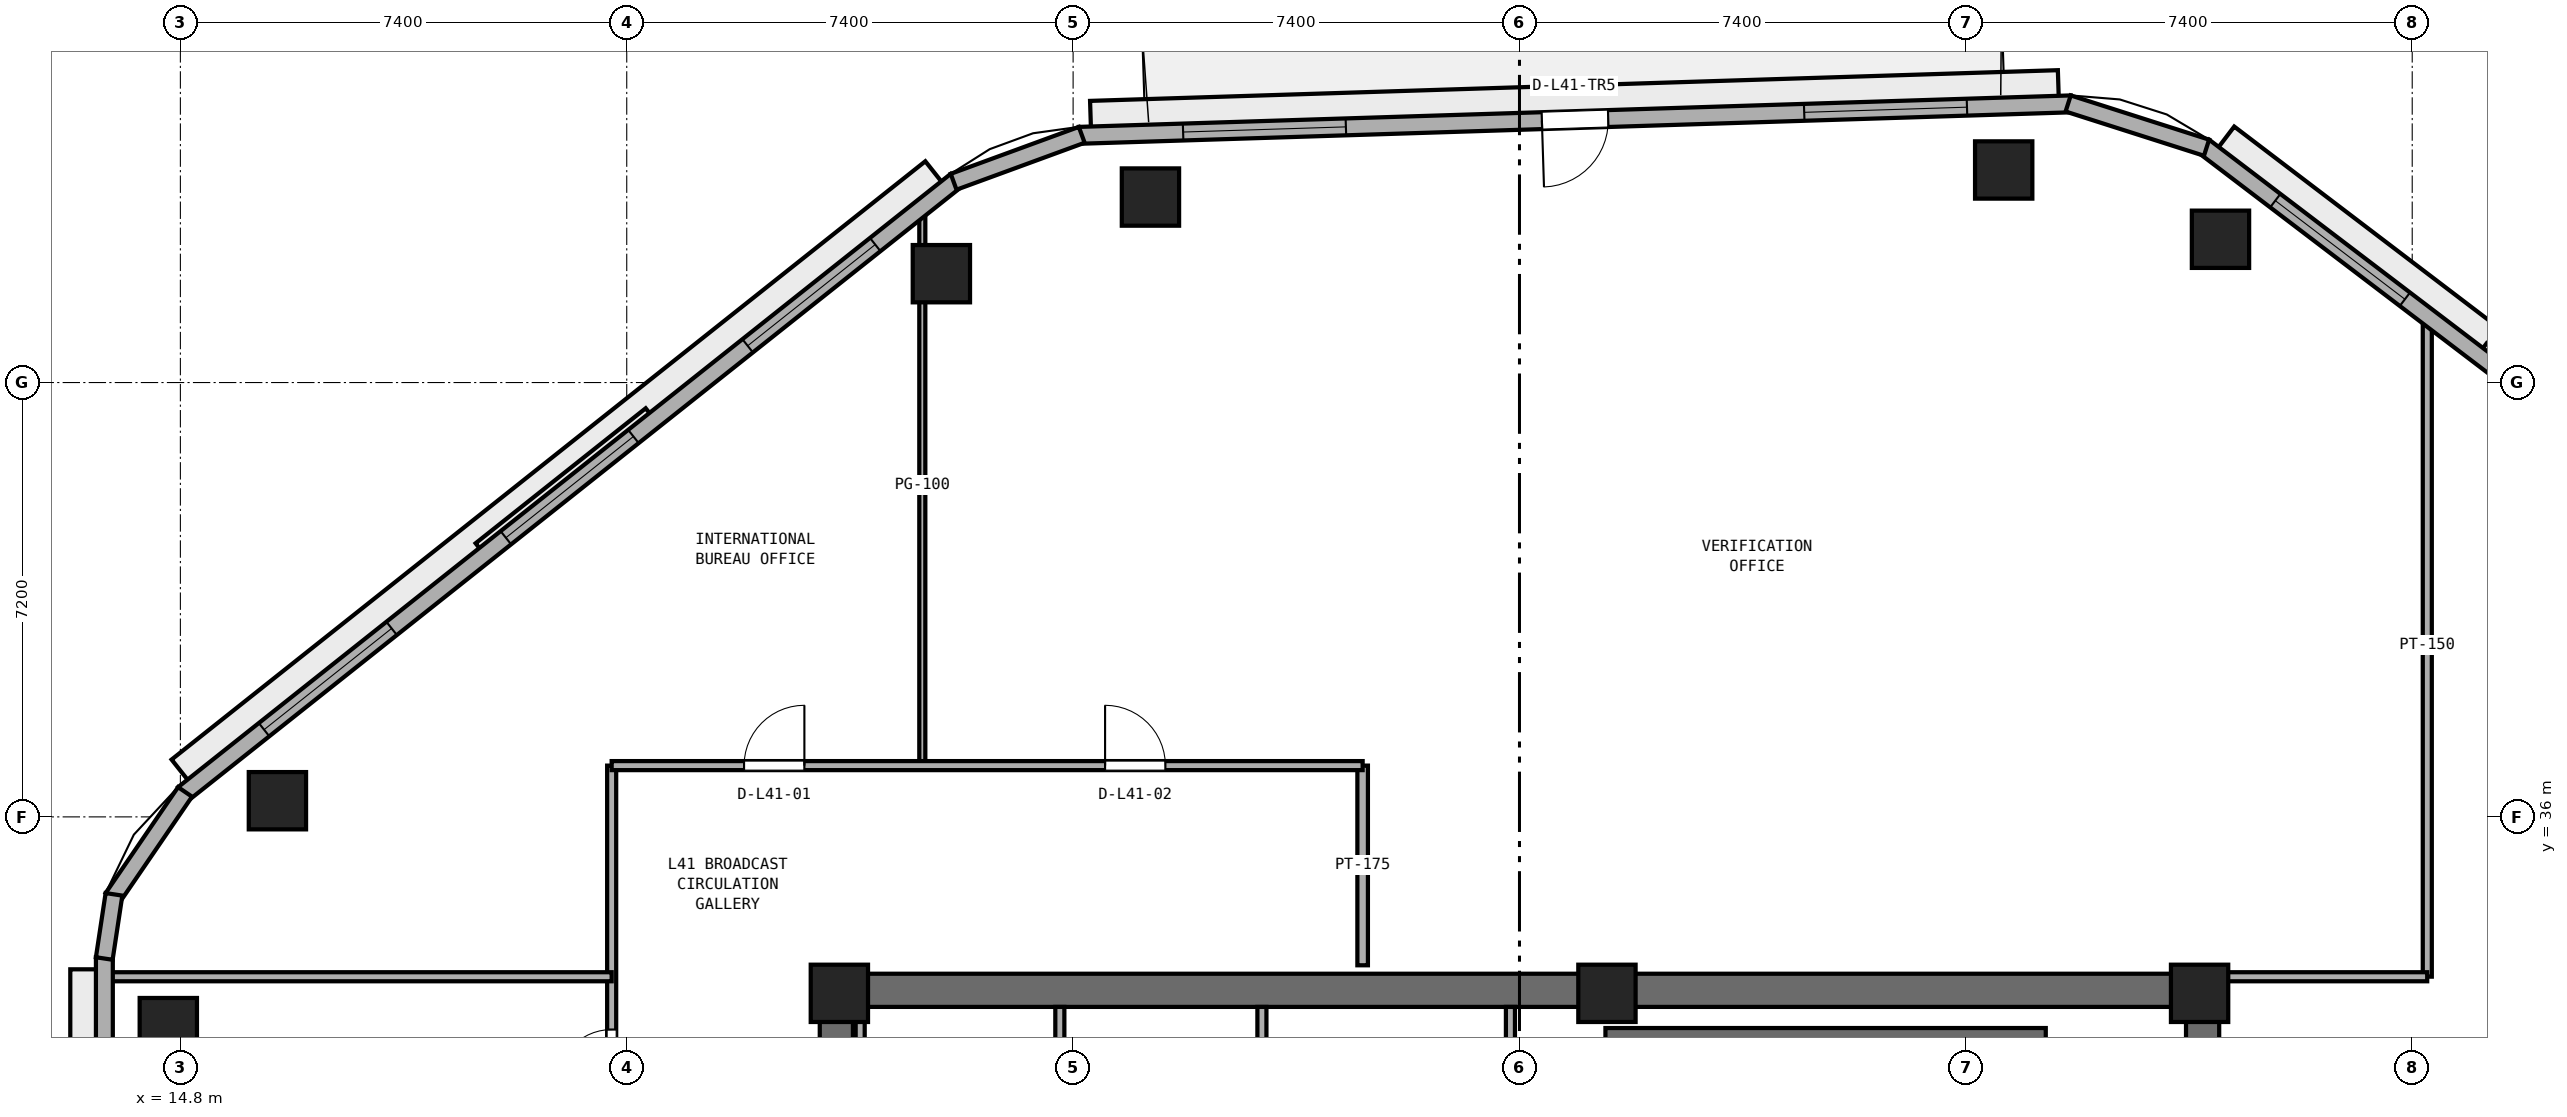
"""IFC4 building model, lengths in metres.
Left out: names, types, materials, properties, quantities, classifications, styles, units other than length and angle.
Written with IfcOpenShell. Run it as: python <this file> out.ifc"""

import sys

from ifc_helpers import new_model, si_unit, direction, frame, frame_2d, origin, origin_2d, place, context, subcontext, project, spatial, rectangle, extrude, element, fill, save


model = new_model("IFC4")
c1 = context("Model", 3, precision=1e-05, world=origin(), true_north=direction((0.0, 1.0)))
c2 = subcontext(c1, "Body", "Model", "MODEL_VIEW")
j1 = project(units=[si_unit("LENGTHUNIT", "METRE"), si_unit("PLANEANGLEUNIT", "RADIAN")], contexts=[c1])
p1 = place(None, origin())
s1 = spatial("IfcSite", under=j1, at=p1, CompositionType="ELEMENT")
p2 = place(p1, origin())
s2 = spatial("IfcBuilding", under=s1, at=p2, CompositionType="ELEMENT")
p3 = place(p2, frame((0.0, 0.0, 163.0)))
s3 = spatial("IfcBuildingStorey", under=s2, at=p3, CompositionType="ELEMENT", Elevation=163.0)
p4 = place(p3, frame((25.4, 33.125, 0.0), z_axis=(0.0, 0.0, 1.0), x_axis=(1.0, 0.0, 0.0)))
e1 = element("IfcWall", 1, at=p4, inside=s3, PredefinedType="SHEAR", context=c2, shape_type="SweptSolid", body=[
    extrude(rectangle(XDim=23.2, YDim=0.55, at=frame_2d((11.6, 0.0))), origin(), (0.0, 0.0, 1.0), 3.54),
])
p5 = place(p3, frame((25.675, 17.55, 0.0), z_axis=(0.0, 0.0, 1.0), x_axis=(0.0, 1.0, 0.0)))
e2 = element("IfcWall", 2, at=p5, inside=s3, PredefinedType="SHEAR", context=c2, shape_type="SweptSolid", body=[
    extrude(rectangle(XDim=15.3, YDim=0.55, at=frame_2d((7.65, 0.0))), origin(), (0.0, 0.0, 1.0), 3.54),
])
p6 = place(p5, frame((6.9, 0.0, 0.0)))
e3 = element("IfcOpeningElement", 3, at=p6, cuts=e2, PredefinedType="OPENING", context=c2, shape_type="SweptSolid", body=[
    extrude(rectangle(XDim=1.5, YDim=2.15, at=frame_2d((0.75, 1.075))), frame((0.0, 0.285, 0.0), z_axis=(0.0, -1.0, 0.0), x_axis=(1.0, 0.0, 0.0)), (0.0, 0.0, 1.0), 0.57),
])
p7 = place(p3, frame((48.325, 17.55, 0.0), z_axis=(0.0, 0.0, 1.0), x_axis=(0.0, 1.0, 0.0)))
e4 = element("IfcWall", 4, at=p7, inside=s3, PredefinedType="SHEAR", context=c2, shape_type="SweptSolid", body=[
    extrude(rectangle(XDim=15.3, YDim=0.55, at=frame_2d((7.65, 0.0))), origin(), (0.0, 0.0, 1.0), 3.54),
])
p8 = place(p7, frame((5.75, 0.0, 0.0)))
e5 = element("IfcOpeningElement", 5, at=p8, cuts=e4, PredefinedType="OPENING", context=c2, shape_type="SweptSolid", body=[
    extrude(rectangle(XDim=1.5, YDim=2.15, at=frame_2d((0.75, 1.075))), frame((0.0, 0.285, 0.0), z_axis=(0.0, -1.0, 0.0), x_axis=(1.0, 0.0, 0.0)), (0.0, 0.0, 1.0), 0.57),
])
for number, where, z_axis, x_axis in (
    (6, (48.275, 33.075, 0.0), (0.0, 0.0, 1.0), (1.0, 0.0, 0.0)),
    (7, (38.45, 33.075, 0.0), (0.0, 0.0, 1.0), (1.0, 0.0, 0.0)),
    (8, (25.725, 33.075, 0.0), (0.0, 0.0, 1.0), (1.0, 0.0, 0.0)),
):
    element("IfcColumn", number, at=place(p3, frame(where, z_axis=z_axis, x_axis=x_axis)), inside=s3, PredefinedType="PILASTER", context=c2, shape_type="SweptSolid", body=[
        extrude(rectangle(XDim=0.95, YDim=0.95, at=origin_2d()), origin(), (0.0, 0.0, 1.0), 3.8),
    ])
for number, where, z_axis, x_axis in (
    (9, (48.622, 45.575, 0.0), (0.0, 0.0, 1.0), (1.0, 0.0, 0.0)),
    (10, (45.028, 46.724, 0.0), (0.0, 0.0, 1.0), (1.0, 0.0, 0.0)),
    (11, (30.882, 46.275, 0.0), (0.0, 0.0, 1.0), (1.0, 0.0, 0.0)),
    (12, (27.416, 45.004, 0.0), (0.0, 0.0, 1.0), (1.0, 0.0, 0.0)),
    (13, (16.409, 36.268, 0.0), (0.0, 0.0, 1.0), (1.0, 0.0, 0.0)),
    (14, (14.6, 32.523, 0.0), (0.0, 0.0, 1.0), (1.0, 0.0, 0.0)),
):
    element("IfcColumn", number, at=place(p3, frame(where, z_axis=z_axis, x_axis=x_axis)), inside=s3, PredefinedType="COLUMN", context=c2, shape_type="SweptSolid", body=[
        extrude(rectangle(XDim=0.95, YDim=0.95, at=origin_2d()), origin(), (0.0, 0.0, 1.0), 3.8),
    ])
p9 = place(p3, frame((38.425, 32.375, 0.0), z_axis=(0.0, 0.0, 1.0), x_axis=(1.0, 0.0, 0.0)))
e15 = element("IfcWall", 15, at=p9, inside=s3, PredefinedType="SHEAR", context=c2, shape_type="SweptSolid", body=[
    extrude(rectangle(XDim=7.3, YDim=0.25, at=frame_2d((3.65, 0.0))), origin(), (0.0, 0.0, 1.0), 3.54),
])
p10 = place(p3, frame((26.07, 30.65, 0.0), z_axis=(0.0, 0.0, 1.0), x_axis=(0.0, 1.0, 0.0)))
e16 = element("IfcWall", 16, at=p10, inside=s3, PredefinedType="PARTITIONING", context=c2, shape_type="SweptSolid", body=[
    extrude(rectangle(XDim=2.2, YDim=0.15, at=frame_2d((1.1, 0.0))), origin(), (0.0, 0.0, 1.0), 2.64),
])
for number, where, z_axis, x_axis in (
    (17, (29.38, 30.65, 0.0), (0.0, 0.0, 1.0), (0.0, 1.0, 0.0)),
    (18, (32.73, 30.65, 0.0), (0.0, 0.0, 1.0), (0.0, 1.0, 0.0)),
    (19, (36.85, 30.65, 0.0), (0.0, 0.0, 1.0), (0.0, 1.0, 0.0)),
):
    element("IfcWall", number, at=place(p3, frame(where, z_axis=z_axis, x_axis=x_axis)), inside=s3, PredefinedType="PARTITIONING", context=c2, shape_type="SweptSolid", body=[
        extrude(rectangle(XDim=2.2, YDim=0.15, at=frame_2d((1.1, 0.0))), origin(), (0.0, 0.0, 1.0), 3.54),
    ])
p11 = place(p3, frame((52.05, 33.352, 0.0), z_axis=(0.0, 0.0, 1.0), x_axis=(0.0, 1.0, 0.0)))
e20 = element("IfcWall", 20, at=p11, inside=s3, PredefinedType="PARTITIONING", context=c2, shape_type="SweptSolid", body=[
    extrude(rectangle(XDim=10.983, YDim=0.15, at=frame_2d((5.491, 0.0))), origin(), (0.0, 0.0, 1.0), 3.54),
])
p12 = place(p3, frame((34.4, 33.54, 0.0), z_axis=(0.0, 0.0, 1.0), x_axis=(0.0, 1.0, 0.0)))
e21 = element("IfcWall", 21, at=p12, inside=s3, PredefinedType="PARTITIONING", context=c2, shape_type="SweptSolid", body=[
    extrude(rectangle(XDim=3.31, YDim=0.175, at=frame_2d((1.655, 0.0))), origin(), (0.0, 0.0, 1.0), 3.54),
])
p13 = place(p3, frame((27.1, 36.85, 0.0), z_axis=(0.0, 0.0, 1.0), x_axis=(0.0, 1.0, 0.0)))
e22 = element("IfcWall", 22, at=p13, inside=s3, PredefinedType="PARTITIONING", context=c2, shape_type="SweptSolid", body=[
    extrude(rectangle(XDim=9.295, YDim=0.1, at=frame_2d((4.648, 0.0))), origin(), (0.0, 0.0, 1.0), 3.54),
])
p14 = place(p3, frame((21.95, 26.55, 0.0), z_axis=(0.0, 0.0, 1.0), x_axis=(0.0, 1.0, 0.0)))
e23 = element("IfcWall", 23, at=p14, inside=s3, PredefinedType="PARTITIONING", context=c2, shape_type="SweptSolid", body=[
    extrude(rectangle(XDim=10.3, YDim=0.15, at=frame_2d((5.15, 0.0))), origin(), (0.0, 0.0, 1.0), 3.54),
])
p15 = place(p14, frame((5.025, 0.0, 0.0)))
e24 = element("IfcOpeningElement", 24, at=p15, cuts=e23, PredefinedType="OPENING", context=c2, shape_type="SweptSolid", body=[
    extrude(rectangle(XDim=0.9, YDim=2.1, at=frame_2d((0.45, 1.05))), frame((0.0, 0.085, 0.0), z_axis=(0.0, -1.0, 0.0), x_axis=(1.0, 0.0, 0.0)), (0.0, 0.0, 1.0), 0.17),
])
p16 = place(p3, frame((13.605, 33.35, 0.0), z_axis=(0.0, 0.0, 1.0), x_axis=(1.0, 0.0, 0.0)))
e25 = element("IfcWall", 25, at=p16, inside=s3, PredefinedType="PARTITIONING", context=c2, shape_type="SweptSolid", body=[
    extrude(rectangle(XDim=8.345, YDim=0.15, at=frame_2d((4.172, 0.0))), origin(), (0.0, 0.0, 1.0), 3.54),
])
p17 = place(p3, frame((48.74, 33.35, 0.0), z_axis=(0.0, 0.0, 1.0), x_axis=(1.0, 0.0, 0.0)))
e26 = element("IfcWall", 26, at=p17, inside=s3, PredefinedType="PARTITIONING", context=c2, shape_type="SweptSolid", body=[
    extrude(rectangle(XDim=3.309, YDim=0.15, at=frame_2d((1.654, 0.0))), origin(), (0.0, 0.0, 1.0), 2.923),
])
p18 = place(p3, frame((21.95, 36.85, 0.0), z_axis=(0.0, 0.0, 1.0), x_axis=(1.0, 0.0, 0.0)))
e27 = element("IfcWall", 27, at=p18, inside=s3, PredefinedType="PARTITIONING", context=c2, shape_type="SweptSolid", body=[
    extrude(rectangle(XDim=12.45, YDim=0.15, at=frame_2d((6.225, 0.0))), origin(), (0.0, 0.0, 1.0), 3.54),
])
p19 = place(p18, frame((2.195, 0.0, 0.0)))
e28 = element("IfcOpeningElement", 28, at=p19, cuts=e27, PredefinedType="OPENING", context=c2, shape_type="SweptSolid", body=[
    extrude(rectangle(XDim=1.0, YDim=2.12, at=frame_2d((0.5, 1.06))), frame((0.0, 0.085, 0.0), z_axis=(0.0, -1.0, 0.0), x_axis=(1.0, 0.0, 0.0)), (0.0, 0.0, 1.0), 0.17),
])
p20 = place(p18, frame((8.18, 0.0, 0.0)))
e29 = element("IfcOpeningElement", 29, at=p20, cuts=e27, PredefinedType="OPENING", context=c2, shape_type="SweptSolid", body=[
    extrude(rectangle(XDim=1.0, YDim=2.12, at=frame_2d((0.5, 1.06))), frame((0.0, 0.085, 0.0), z_axis=(0.0, -1.0, 0.0), x_axis=(1.0, 0.0, 0.0)), (0.0, 0.0, 1.0), 0.17),
])
p21 = place(p3, frame((60.295, 38.025, 0.0), z_axis=(0.0, 0.0, 1.0), x_axis=(-0.795831760834, 0.605517801925, 0.0)))
e30 = element("IfcWall", 30, at=p21, inside=s3, PredefinedType="STANDARD", context=c2, shape_type="SweptSolid", body=[
    extrude(rectangle(XDim=15.012, YDim=0.28, at=frame_2d((7.506, 0.0))), origin(), (0.0, 0.0, 1.0), 3.54),
])
p22 = place(p21, frame((1.485, 0.0, 0.9)))
e31 = element("IfcOpeningElement", 31, at=p22, cuts=e30, PredefinedType="OPENING", context=c2, shape_type="SweptSolid", body=[
    extrude(rectangle(XDim=2.7, YDim=1.75, at=frame_2d((1.35, 0.875))), frame((0.0, 0.15, 0.0), z_axis=(0.0, -1.0, 0.0), x_axis=(1.0, 0.0, 0.0)), (0.0, 0.0, 1.0), 0.3),
])
p23 = place(p21, frame((6.156, 0.0, 0.9)))
e32 = element("IfcOpeningElement", 32, at=p23, cuts=e30, PredefinedType="OPENING", context=c2, shape_type="SweptSolid", body=[
    extrude(rectangle(XDim=2.7, YDim=1.75, at=frame_2d((1.35, 0.875))), frame((0.0, 0.15, 0.0), z_axis=(0.0, -1.0, 0.0), x_axis=(1.0, 0.0, 0.0)), (0.0, 0.0, 1.0), 0.3),
])
p24 = place(p21, frame((10.826, 0.0, 0.9)))
e33 = element("IfcOpeningElement", 33, at=p24, cuts=e30, PredefinedType="OPENING", context=c2, shape_type="SweptSolid", body=[
    extrude(rectangle(XDim=2.7, YDim=1.75, at=frame_2d((1.35, 0.875))), frame((0.0, 0.15, 0.0), z_axis=(0.0, -1.0, 0.0), x_axis=(1.0, 0.0, 0.0)), (0.0, 0.0, 1.0), 0.3),
])
p25 = place(p3, frame((46.143, 47.82, 0.0), z_axis=(0.0, 0.0, 1.0), x_axis=(-0.999497065256, -0.031711457627, 0.0)))
e34 = element("IfcWall", 34, at=p25, inside=s3, PredefinedType="STANDARD", context=c2, shape_type="SweptSolid", body=[
    extrude(rectangle(XDim=16.452, YDim=0.28, at=frame_2d((8.226, 0.0))), origin(), (0.0, 0.0, 1.0), 3.54),
])
p26 = place(p25, frame((7.676, 0.0, 0.0)))
e35 = element("IfcOpeningElement", 35, at=p26, cuts=e34, PredefinedType="OPENING", context=c2, shape_type="SweptSolid", body=[
    extrude(rectangle(XDim=1.1, YDim=2.2, at=frame_2d((0.55, 1.1))), frame((0.0, 0.15, 0.0), z_axis=(0.0, -1.0, 0.0), x_axis=(1.0, 0.0, 0.0)), (0.0, 0.0, 1.0), 0.3),
])
p27 = place(p25, frame((1.725, 0.0, 0.9)))
e36 = element("IfcOpeningElement", 36, at=p27, cuts=e34, PredefinedType="OPENING", context=c2, shape_type="SweptSolid", body=[
    extrude(rectangle(XDim=2.7, YDim=1.75, at=frame_2d((1.35, 0.875))), frame((0.0, 0.15, 0.0), z_axis=(0.0, -1.0, 0.0), x_axis=(1.0, 0.0, 0.0)), (0.0, 0.0, 1.0), 0.3),
])
p28 = place(p25, frame((12.027, 0.0, 0.9)))
e37 = element("IfcOpeningElement", 37, at=p28, cuts=e34, PredefinedType="OPENING", context=c2, shape_type="SweptSolid", body=[
    extrude(rectangle(XDim=2.7, YDim=1.75, at=frame_2d((1.35, 0.875))), frame((0.0, 0.15, 0.0), z_axis=(0.0, -1.0, 0.0), x_axis=(1.0, 0.0, 0.0)), (0.0, 0.0, 1.0), 0.3),
])
p29 = place(p3, frame((27.658, 46.55, 0.0), z_axis=(0.0, 0.0, 1.0), x_axis=(-0.783266285861, -0.621686356158, 0.0)))
e38 = element("IfcWall", 38, at=p29, inside=s3, PredefinedType="STANDARD", context=c2, shape_type="SweptSolid", body=[
    extrude(rectangle(XDim=16.353, YDim=0.28, at=frame_2d((8.177, 0.0))), origin(), (0.0, 0.0, 1.0), 3.54),
])
p30 = place(p29, frame((1.709, 0.0, 0.9)))
e39 = element("IfcOpeningElement", 39, at=p30, cuts=e38, PredefinedType="OPENING", context=c2, shape_type="SweptSolid", body=[
    extrude(rectangle(XDim=2.7, YDim=1.75, at=frame_2d((1.35, 0.875))), frame((0.0, 0.15, 0.0), z_axis=(0.0, -1.0, 0.0), x_axis=(1.0, 0.0, 0.0)), (0.0, 0.0, 1.0), 0.3),
])
p31 = place(p29, frame((6.826, 0.0, 0.9)))
e40 = element("IfcOpeningElement", 40, at=p31, cuts=e38, PredefinedType="OPENING", context=c2, shape_type="SweptSolid", body=[
    extrude(rectangle(XDim=2.7, YDim=1.75, at=frame_2d((1.35, 0.875))), frame((0.0, 0.15, 0.0), z_axis=(0.0, -1.0, 0.0), x_axis=(1.0, 0.0, 0.0)), (0.0, 0.0, 1.0), 0.3),
])
p32 = place(p29, frame((11.944, 0.0, 0.9)))
e41 = element("IfcOpeningElement", 41, at=p32, cuts=e38, PredefinedType="OPENING", context=c2, shape_type="SweptSolid", body=[
    extrude(rectangle(XDim=2.7, YDim=1.75, at=frame_2d((1.35, 0.875))), frame((0.0, 0.15, 0.0), z_axis=(0.0, -1.0, 0.0), x_axis=(1.0, 0.0, 0.0)), (0.0, 0.0, 1.0), 0.3),
])
p33 = place(p3, frame((13.54, 33.673, 0.0), z_axis=(0.0, 0.0, 1.0), x_axis=(0.0, -1.0, 0.0)))
e42 = element("IfcWall", 42, at=p33, inside=s3, PredefinedType="STANDARD", context=c2, shape_type="SweptSolid", body=[
    extrude(rectangle(XDim=17.751, YDim=0.28, at=frame_2d((8.875, 0.0))), origin(), (0.0, 0.0, 1.0), 3.54),
])
p34 = place(p33, frame((13.109, 0.0, 0.9)))
e43 = element("IfcOpeningElement", 43, at=p34, cuts=e42, PredefinedType="OPENING", context=c2, shape_type="SweptSolid", body=[
    extrude(rectangle(XDim=2.7, YDim=1.75, at=frame_2d((1.35, 0.875))), frame((0.0, 0.15, 0.0), z_axis=(0.0, -1.0, 0.0), x_axis=(1.0, 0.0, 0.0)), (0.0, 0.0, 1.0), 0.3),
])
p35 = place(p3, frame((48.39, 47.093, 0.0), z_axis=(0.0, 0.0, 1.0), x_axis=(-0.952542948918, 0.304404222156, 0.0)))
e44 = element("IfcWall", 44, at=p35, inside=s3, PredefinedType="STANDARD", context=c2, shape_type="SweptSolid", body=[
    extrude(rectangle(XDim=2.408, YDim=0.28, at=frame_2d((1.204, 0.0))), origin(), (0.0, 0.0, 1.0), 3.54),
])
p36 = place(p3, frame((29.743, 47.306, 0.0), z_axis=(0.0, 0.0, 1.0), x_axis=(-0.93893328381, -0.344099242302, 0.0)))
e45 = element("IfcWall", 45, at=p36, inside=s3, PredefinedType="STANDARD", context=c2, shape_type="SweptSolid", body=[
    extrude(rectangle(XDim=2.262, YDim=0.28, at=frame_2d((1.131, 0.0))), origin(), (0.0, 0.0, 1.0), 3.54),
])
p37 = place(p3, frame((14.878, 36.414, 0.0), z_axis=(0.0, 0.0, 1.0), x_axis=(-0.564564614133, -0.825388875906, 0.0)))
e46 = element("IfcWall", 46, at=p37, inside=s3, PredefinedType="STANDARD", context=c2, shape_type="SweptSolid", body=[
    extrude(rectangle(XDim=2.128, YDim=0.28, at=frame_2d((1.064, 0.0))), origin(), (0.0, 0.0, 1.0), 3.54),
])
p38 = place(p3, frame((13.699, 34.716, 0.0), z_axis=(0.0, 0.0, 1.0), x_axis=(-0.149549920187, -0.988754176412, 0.0)))
e47 = element("IfcWall", 47, at=p38, inside=s3, PredefinedType="STANDARD", context=c2, shape_type="SweptSolid", body=[
    extrude(rectangle(XDim=1.076, YDim=0.28, at=frame_2d((0.538, 0.0))), origin(), (0.0, 0.0, 1.0), 3.54),
])
p39 = place(p19, origin())
e48 = element("IfcDoor", 48, at=p39, inside=s3, OperationType="SINGLE_SWING_RIGHT", PredefinedType="DOOR", context=c2, shape_type="SweptSolid", body=[
    extrude(rectangle(XDim=1.0, YDim=2.12, at=frame_2d((0.5, 1.06))), frame((0.0, 0.025, 0.0), z_axis=(0.0, -1.0, 0.0), x_axis=(1.0, 0.0, 0.0)), (0.0, 0.0, 1.0), 0.05),
])
fill(e28, e48)
p40 = place(p20, origin())
e49 = element("IfcDoor", 49, at=p40, inside=s3, OperationType="SINGLE_SWING_LEFT", PredefinedType="DOOR", context=c2, shape_type="SweptSolid", body=[
    extrude(rectangle(XDim=1.0, YDim=2.12, at=frame_2d((0.5, 1.06))), frame((0.0, 0.025, 0.0), z_axis=(0.0, -1.0, 0.0), x_axis=(1.0, 0.0, 0.0)), (0.0, 0.0, 1.0), 0.05),
])
fill(e29, e49)
p41 = place(p15, origin())
e50 = element("IfcDoor", 50, at=p41, inside=s3, OperationType="SINGLE_SWING_LEFT", PredefinedType="DOOR", context=c2, shape_type="SweptSolid", body=[
    extrude(rectangle(XDim=0.9, YDim=2.1, at=frame_2d((0.45, 1.05))), frame((0.0, 0.025, 0.0), z_axis=(0.0, -1.0, 0.0), x_axis=(1.0, 0.0, 0.0)), (0.0, 0.0, 1.0), 0.05),
])
fill(e24, e50)
p42 = place(p24, origin())
e51 = element("IfcWindow", 51, at=p42, inside=s3, PartitioningType="SINGLE_PANEL", PredefinedType="WINDOW", context=c2, shape_type="SweptSolid", body=[
    extrude(rectangle(XDim=2.7, YDim=1.75, at=frame_2d((1.35, 0.875))), frame((0.0, 0.03, 0.0), z_axis=(0.0, -1.0, 0.0), x_axis=(1.0, 0.0, 0.0)), (0.0, 0.0, 1.0), 0.06),
])
fill(e33, e51)
p43 = place(p26, origin())
e52 = element("IfcDoor", 52, at=p43, inside=s3, OperationType="SINGLE_SWING_RIGHT", PredefinedType="DOOR", context=c2, shape_type="SweptSolid", body=[
    extrude(rectangle(XDim=1.1, YDim=2.2, at=frame_2d((0.55, 1.1))), frame((0.0, 0.025, 0.0), z_axis=(0.0, -1.0, 0.0), x_axis=(1.0, 0.0, 0.0)), (0.0, 0.0, 1.0), 0.05),
])
fill(e35, e52)
p44 = place(p27, origin())
e53 = element("IfcWindow", 53, at=p44, inside=s3, PartitioningType="SINGLE_PANEL", PredefinedType="WINDOW", context=c2, shape_type="SweptSolid", body=[
    extrude(rectangle(XDim=2.7, YDim=1.75, at=frame_2d((1.35, 0.875))), frame((0.0, 0.03, 0.0), z_axis=(0.0, -1.0, 0.0), x_axis=(1.0, 0.0, 0.0)), (0.0, 0.0, 1.0), 0.06),
])
fill(e36, e53)
p45 = place(p28, origin())
e54 = element("IfcWindow", 54, at=p45, inside=s3, PartitioningType="SINGLE_PANEL", PredefinedType="WINDOW", context=c2, shape_type="SweptSolid", body=[
    extrude(rectangle(XDim=2.7, YDim=1.75, at=frame_2d((1.35, 0.875))), frame((0.0, 0.03, 0.0), z_axis=(0.0, -1.0, 0.0), x_axis=(1.0, 0.0, 0.0)), (0.0, 0.0, 1.0), 0.06),
])
fill(e37, e54)
p46 = place(p30, origin())
e55 = element("IfcWindow", 55, at=p46, inside=s3, PartitioningType="SINGLE_PANEL", PredefinedType="WINDOW", context=c2, shape_type="SweptSolid", body=[
    extrude(rectangle(XDim=2.7, YDim=1.75, at=frame_2d((1.35, 0.875))), frame((0.0, 0.03, 0.0), z_axis=(0.0, -1.0, 0.0), x_axis=(1.0, 0.0, 0.0)), (0.0, 0.0, 1.0), 0.06),
])
fill(e39, e55)
p47 = place(p31, origin())
e56 = element("IfcWindow", 56, at=p47, inside=s3, PartitioningType="SINGLE_PANEL", PredefinedType="WINDOW", context=c2, shape_type="SweptSolid", body=[
    extrude(rectangle(XDim=2.7, YDim=1.75, at=frame_2d((1.35, 0.875))), frame((0.0, 0.03, 0.0), z_axis=(0.0, -1.0, 0.0), x_axis=(1.0, 0.0, 0.0)), (0.0, 0.0, 1.0), 0.06),
])
fill(e40, e56)
p48 = place(p32, origin())
e57 = element("IfcWindow", 57, at=p48, inside=s3, PartitioningType="SINGLE_PANEL", PredefinedType="WINDOW", context=c2, shape_type="SweptSolid", body=[
    extrude(rectangle(XDim=2.7, YDim=1.75, at=frame_2d((1.35, 0.875))), frame((0.0, 0.03, 0.0), z_axis=(0.0, -1.0, 0.0), x_axis=(1.0, 0.0, 0.0)), (0.0, 0.0, 1.0), 0.06),
])
fill(e41, e57)
save(model, sys.argv[1])
